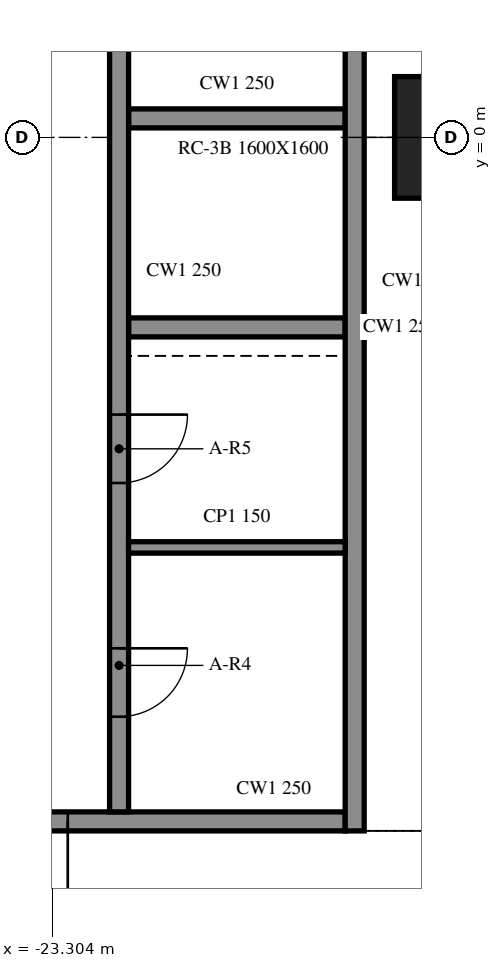
"""IFC4 building model, lengths in metres.
Left out: names, types, materials, properties, quantities, classifications, styles, units other than length and angle.
Written with IfcOpenShell. Run it as: python <this file> out.ifc"""

import sys

from ifc_helpers import new_model, si_unit, direction, frame, frame_2d, origin, origin_2d, place, context, subcontext, project, spatial, rectangle, extrude, element, fill, save


model = new_model("IFC4")
c1 = context("Model", 3, precision=1e-05, world=origin(), true_north=direction((0.0, 1.0)))
c2 = subcontext(c1, "Body", "Model", "MODEL_VIEW")
j1 = project(units=[si_unit("LENGTHUNIT", "METRE"), si_unit("PLANEANGLEUNIT", "RADIAN")], contexts=[c1])
p1 = place(None, origin())
s1 = spatial("IfcSite", under=j1, at=p1, CompositionType="ELEMENT")
p2 = place(p1, origin())
s2 = spatial("IfcBuilding", under=s1, at=p2, CompositionType="ELEMENT")
p3 = place(p2, frame((0.0, 0.0, 41.6)))
s3 = spatial("IfcBuildingStorey", under=s2, at=p3, CompositionType="ELEMENT", Elevation=41.6)
p4 = place(p3, frame((-18.0, 0.0, -0.55), z_axis=(0.0, 0.0, 1.0), x_axis=(1.0, 0.0, 0.0)))
e1 = element("IfcColumn", 1, at=p4, inside=s3, PredefinedType="COLUMN", context=c2, shape_type="SweptSolid", body=[
    extrude(rectangle(XDim=1.6, YDim=1.6, at=origin_2d()), origin(), (0.0, 0.0, 1.0), 4.61),
])
p5 = place(p3, frame((-19.325, -9.125, 0.0), z_axis=(0.0, 0.0, 1.0), x_axis=(0.0, 1.0, 0.0)))
e2 = element("IfcWall", 2, at=p5, inside=s3, PredefinedType="SOLIDWALL", context=c2, shape_type="SweptSolid", body=[
    extrude(rectangle(XDim=24.25, YDim=0.25, at=frame_2d((12.125, 0.0))), origin(), (0.0, 0.0, 1.0), 4.06),
])
p6 = place(p3, frame((-19.45, -9.0, 0.0), z_axis=(0.0, 0.0, 1.0), x_axis=(-1.0, 0.0, 0.0)))
e3 = element("IfcWall", 3, at=p6, inside=s3, PredefinedType="SOLIDWALL", context=c2, shape_type="SweptSolid", body=[
    extrude(rectangle(XDim=9.1, YDim=0.25, at=frame_2d((4.55, 0.0))), origin(), (0.0, 0.0, 1.0), 4.06),
])
p7 = place(p6, frame((3.65, 0.0, 0.0)))
e4 = element("IfcOpeningElement", 4, at=p7, cuts=e3, PredefinedType="OPENING", context=c2, shape_type="SweptSolid", body=[
    extrude(rectangle(XDim=1.8, YDim=2.1, at=frame_2d((0.9, 1.05))), frame((0.0, 0.135, 0.0), z_axis=(0.0, -1.0, 0.0), x_axis=(1.0, 0.0, 0.0)), (0.0, 0.0, 1.0), 0.27),
])
p8 = place(p3, frame((-22.425, 14.875, 0.0), z_axis=(0.0, 0.0, 1.0), x_axis=(0.0, -1.0, 0.0)))
e5 = element("IfcWall", 5, at=p8, inside=s3, PredefinedType="SOLIDWALL", context=c2, shape_type="SweptSolid", body=[
    extrude(rectangle(XDim=23.75, YDim=0.25, at=frame_2d((11.875, 0.0))), origin(), (0.0, 0.0, 1.0), 4.06),
])
p9 = place(p8, frame((21.597, 0.0, 0.0)))
e6 = element("IfcOpeningElement", 6, at=p9, cuts=e5, PredefinedType="OPENING", context=c2, shape_type="SweptSolid", body=[
    extrude(rectangle(XDim=0.9, YDim=2.1, at=frame_2d((0.45, 1.05))), frame((0.0, 0.135, 0.0), z_axis=(0.0, -1.0, 0.0), x_axis=(1.0, 0.0, 0.0)), (0.0, 0.0, 1.0), 0.27),
])
p10 = place(p8, frame((18.522, 0.0, 0.0)))
e7 = element("IfcOpeningElement", 7, at=p10, cuts=e5, PredefinedType="OPENING", context=c2, shape_type="SweptSolid", body=[
    extrude(rectangle(XDim=0.9, YDim=2.1, at=frame_2d((0.45, 1.05))), frame((0.0, 0.135, 0.0), z_axis=(0.0, -1.0, 0.0), x_axis=(1.0, 0.0, 0.0)), (0.0, 0.0, 1.0), 0.27),
])
p11 = place(p8, frame((4.087, 0.0, 0.0)))
e8 = element("IfcOpeningElement", 8, at=p11, cuts=e5, PredefinedType="OPENING", context=c2, shape_type="SweptSolid", body=[
    extrude(rectangle(XDim=0.9, YDim=2.1, at=frame_2d((0.45, 1.05))), frame((0.0, 0.135, 0.0), z_axis=(0.0, -1.0, 0.0), x_axis=(1.0, 0.0, 0.0)), (0.0, 0.0, 1.0), 0.27),
])
p12 = place(p8, frame((1.012, 0.0, 0.0)))
e9 = element("IfcOpeningElement", 9, at=p12, cuts=e5, PredefinedType="OPENING", context=c2, shape_type="SweptSolid", body=[
    extrude(rectangle(XDim=0.9, YDim=2.1, at=frame_2d((0.45, 1.05))), frame((0.0, 0.135, 0.0), z_axis=(0.0, -1.0, 0.0), x_axis=(1.0, 0.0, 0.0)), (0.0, 0.0, 1.0), 0.27),
])
for number, where, z_axis, x_axis in (
    (10, (-22.3, -2.5, 0.0), (0.0, 0.0, 1.0), (1.0, 0.0, 0.0)),
    (11, (-22.3, 0.25, 0.0), (0.0, 0.0, 1.0), (1.0, 0.0, 0.0)),
):
    element("IfcWall", number, at=place(p3, frame(where, z_axis=z_axis, x_axis=x_axis)), inside=s3, PredefinedType="SOLIDWALL", context=c2, shape_type="SweptSolid", body=[
        extrude(rectangle(XDim=2.85, YDim=0.25, at=frame_2d((1.425, 0.0))), origin(), (0.0, 0.0, 1.0), 4.06),
    ])
p13 = place(p3, frame((-22.3, -5.395, 0.0), z_axis=(0.0, 0.0, 1.0), x_axis=(1.0, 0.0, 0.0)))
e12 = element("IfcWall", 12, at=p13, inside=s3, PredefinedType="PARTITIONING", context=c2, shape_type="SweptSolid", body=[
    extrude(rectangle(XDim=2.85, YDim=0.15, at=frame_2d((1.425, 0.0))), origin(), (0.0, 0.0, 1.0), 4.06),
])
p14 = place(p7, origin())
e13 = element("IfcDoor", 13, at=p14, inside=s3, OperationType="DOUBLE_DOOR_SINGLE_SWING", PredefinedType="DOOR", context=c2, shape_type="SweptSolid", body=[
    extrude(rectangle(XDim=1.8, YDim=2.1, at=frame_2d((0.9, 1.05))), frame((0.0, 0.025, 0.0), z_axis=(0.0, -1.0, 0.0), x_axis=(1.0, 0.0, 0.0)), (0.0, 0.0, 1.0), 0.05),
])
fill(e4, e13)
p15 = place(p9, origin())
e14 = element("IfcDoor", 14, at=p15, inside=s3, OperationType="SINGLE_SWING_RIGHT", PredefinedType="DOOR", context=c2, shape_type="SweptSolid", body=[
    extrude(rectangle(XDim=0.9, YDim=2.1, at=frame_2d((0.45, 1.05))), frame((0.0, 0.025, 0.0), z_axis=(0.0, -1.0, 0.0), x_axis=(1.0, 0.0, 0.0)), (0.0, 0.0, 1.0), 0.05),
])
fill(e6, e14)
p16 = place(p10, origin())
e15 = element("IfcDoor", 15, at=p16, inside=s3, OperationType="SINGLE_SWING_LEFT", PredefinedType="DOOR", context=c2, shape_type="SweptSolid", body=[
    extrude(rectangle(XDim=0.9, YDim=2.1, at=frame_2d((0.45, 1.05))), frame((0.0, 0.025, 0.0), z_axis=(0.0, -1.0, 0.0), x_axis=(1.0, 0.0, 0.0)), (0.0, 0.0, 1.0), 0.05),
])
fill(e7, e15)
save(model, sys.argv[1])
